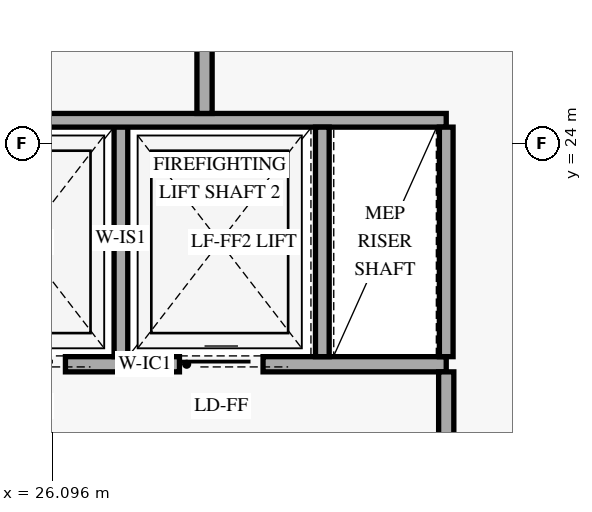
"""IFC4 building model, lengths in metres.
Left out: names, types, materials, properties, quantities, classifications, styles, units other than length and angle.
Written with IfcOpenShell. Run it as: python <this file> out.ifc"""

import sys

from ifc_helpers import new_model, si_unit, direction, frame, frame_2d, origin, place, context, subcontext, project, spatial, rectangle, extrude, element, fill, save


model = new_model("IFC4")
c1 = context("Model", 3, precision=1e-05, world=origin(), true_north=direction((0.0, 1.0)))
c2 = subcontext(c1, "Body", "Model", "MODEL_VIEW")
j1 = project(units=[si_unit("LENGTHUNIT", "METRE"), si_unit("PLANEANGLEUNIT", "RADIAN")], contexts=[c1])
p1 = place(None, origin())
s1 = spatial("IfcSite", under=j1, at=p1, CompositionType="ELEMENT")
p2 = place(p1, origin())
s2 = spatial("IfcBuilding", under=s1, at=p2, CompositionType="ELEMENT")
p3 = place(p2, frame((0.0, 0.0, 106.2)))
s3 = spatial("IfcBuildingStorey", under=s2, at=p3, CompositionType="ELEMENT", Elevation=106.2)
p4 = place(p3, frame((24.45, 21.09, 0.0), z_axis=(0.0, 0.0, 1.0), x_axis=(1.0, 0.0, 0.0)))
e1 = element("IfcWall", 1, at=p4, inside=s3, PredefinedType="STANDARD", context=c2, shape_type="SweptSolid", body=[
    extrude(rectangle(XDim=6.83, YDim=0.2, at=frame_2d((3.415, 0.0))), origin(), (0.0, 0.0, 1.0), 3.36),
])
p5 = place(p4, frame((0.72, 0.0, 0.0)))
e2 = element("IfcOpeningElement", 2, at=p5, cuts=e1, PredefinedType="OPENING", context=c2, shape_type="SweptSolid", body=[
    extrude(rectangle(XDim=1.1, YDim=2.2, at=frame_2d((0.55, 1.1))), frame((0.0, 0.11, 0.0), z_axis=(0.0, -1.0, 0.0), x_axis=(1.0, 0.0, 0.0)), (0.0, 0.0, 1.0), 0.22),
])
p6 = place(p4, frame((3.32, 0.0, 0.0)))
e3 = element("IfcOpeningElement", 3, at=p6, cuts=e1, PredefinedType="OPENING", context=c2, shape_type="SweptSolid", body=[
    extrude(rectangle(XDim=1.1, YDim=2.2, at=frame_2d((0.55, 1.1))), frame((0.0, 0.11, 0.0), z_axis=(0.0, -1.0, 0.0), x_axis=(1.0, 0.0, 0.0)), (0.0, 0.0, 1.0), 0.22),
])
p7 = place(p3, frame((31.28, 17.07, 0.0), z_axis=(0.0, 0.0, 1.0), x_axis=(0.0, 1.0, 0.0)))
e4 = element("IfcWall", 4, at=p7, inside=s3, PredefinedType="STANDARD", context=c2, shape_type="SweptSolid", body=[
    extrude(rectangle(XDim=3.92, YDim=0.2, at=frame_2d((1.96, 0.0))), origin(), (0.0, 0.0, 1.0), 2.731),
])
p8 = place(p7, frame((1.35, 0.0, 0.0)))
e5 = element("IfcOpeningElement", 5, at=p8, cuts=e4, PredefinedType="OPENING", context=c2, shape_type="SweptSolid", body=[
    extrude(rectangle(XDim=1.2, YDim=2.15, at=frame_2d((0.6, 1.075))), frame((0.0, 0.11, 0.0), z_axis=(0.0, -1.0, 0.0), x_axis=(1.0, 0.0, 0.0)), (0.0, 0.0, 1.0), 0.22),
])
p9 = place(p3, frame((27.0, 21.19, 0.0), z_axis=(0.0, 0.0, 1.0), x_axis=(0.0, 1.0, 0.0)))
e6 = element("IfcWall", 6, at=p9, inside=s3, PredefinedType="STANDARD", context=c2, shape_type="SweptSolid", body=[
    extrude(rectangle(XDim=3.11, YDim=0.18, at=frame_2d((1.555, 0.0))), origin(), (0.0, 0.0, 1.0), 3.36),
])
p10 = place(p3, frame((24.45, 24.3, 0.0), z_axis=(0.0, 0.0, 1.0), x_axis=(1.0, 0.0, 0.0)))
e7 = element("IfcWall", 7, at=p10, inside=s3, PredefinedType="STANDARD", context=c2, shape_type="SweptSolid", body=[
    extrude(rectangle(XDim=6.83, YDim=0.18, at=frame_2d((3.415, 0.0))), origin(), (0.0, 0.0, 1.0), 3.36),
])
for number, where, z_axis, x_axis in (
    (8, (29.65, 21.19, 0.0), (0.0, 0.0, 1.0), (0.0, 1.0, 0.0)),
    (9, (31.28, 21.19, 0.0), (0.0, 0.0, 1.0), (0.0, 1.0, 0.0)),
):
    element("IfcWall", number, at=place(p3, frame(where, z_axis=z_axis, x_axis=x_axis)), inside=s3, PredefinedType="STANDARD", context=c2, shape_type="SweptSolid", body=[
        extrude(rectangle(XDim=3.02, YDim=0.18, at=frame_2d((1.51, 0.0))), origin(), (0.0, 0.0, 1.0), 3.36),
    ])
p11 = place(p3, frame((28.1, 24.39, 0.0), z_axis=(0.0, 0.0, 1.0), x_axis=(0.0, 1.0, 0.0)))
e10 = element("IfcWall", 10, at=p11, inside=s3, PredefinedType="STANDARD", context=c2, shape_type="SweptSolid", body=[
    extrude(rectangle(XDim=4.75, YDim=0.2, at=frame_2d((2.375, 0.0))), origin(), (0.0, 0.0, 1.0), 3.36),
])
p12 = place(p11, frame((1.86, 0.0, 0.0)))
e11 = element("IfcOpeningElement", 11, at=p12, cuts=e10, PredefinedType="OPENING", context=c2, shape_type="SweptSolid", body=[
    extrude(rectangle(XDim=0.9, YDim=2.1, at=frame_2d((0.45, 1.05))), frame((0.0, 0.11, 0.0), z_axis=(0.0, -1.0, 0.0), x_axis=(1.0, 0.0, 0.0)), (0.0, 0.0, 1.0), 0.22),
])
p13 = place(p5, origin())
e12 = element("IfcDoor", 12, at=p13, inside=s3, OperationType="SLIDING_TO_LEFT", PredefinedType="DOOR", context=c2, shape_type="SweptSolid", body=[
    extrude(rectangle(XDim=1.1, YDim=2.2, at=frame_2d((0.55, 1.1))), frame((0.0, 0.025, 0.0), z_axis=(0.0, -1.0, 0.0), x_axis=(1.0, 0.0, 0.0)), (0.0, 0.0, 1.0), 0.05),
])
fill(e2, e12)
p14 = place(p6, origin())
e13 = element("IfcDoor", 13, at=p14, inside=s3, OperationType="SLIDING_TO_LEFT", PredefinedType="DOOR", context=c2, shape_type="SweptSolid", body=[
    extrude(rectangle(XDim=1.1, YDim=2.2, at=frame_2d((0.55, 1.1))), frame((0.0, 0.025, 0.0), z_axis=(0.0, -1.0, 0.0), x_axis=(1.0, 0.0, 0.0)), (0.0, 0.0, 1.0), 0.05),
])
fill(e3, e13)
save(model, sys.argv[1])
